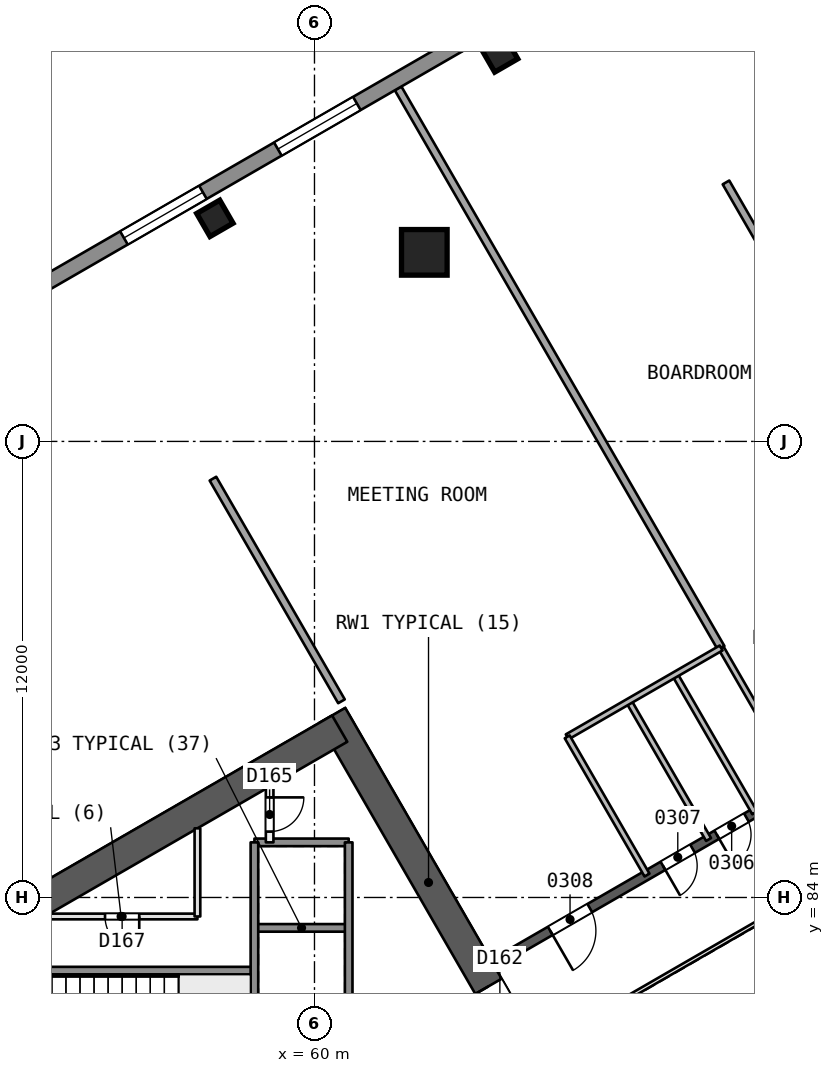
"""IFC4 building model, lengths in metres.
Left out: names, types, materials, properties, quantities, classifications, styles, units other than length and angle.
Written with IfcOpenShell. Run it as: python <this file> out.ifc"""

import sys

from ifc_helpers import new_model, si_unit, direction, frame, frame_2d, origin, origin_2d, place, context, subcontext, project, spatial, rectangle, extrude, element, fill, save


model = new_model("IFC4")
c1 = context("Model", 3, precision=1e-05, world=origin(), true_north=direction((0.0, 1.0)))
c2 = subcontext(c1, "Body", "Model", "MODEL_VIEW")
j1 = project(units=[si_unit("LENGTHUNIT", "METRE"), si_unit("PLANEANGLEUNIT", "RADIAN")], contexts=[c1])
p1 = place(None, origin())
s1 = spatial("IfcSite", under=j1, at=p1, CompositionType="ELEMENT")
p2 = place(p1, origin())
s2 = spatial("IfcBuilding", under=s1, at=p2, CompositionType="ELEMENT")
p3 = place(p2, frame((0.0, 0.0, 20.4)))
s3 = spatial("IfcBuildingStorey", under=s2, at=p3, CompositionType="ELEMENT", Elevation=20.4)
p4 = place(p3, frame((65.538, 80.0, 0.0), z_axis=(0.0, 0.0, 1.0), x_axis=(-0.49999662545, 0.866027352073, 0.0)))
e1 = element("IfcWall", 1, at=p4, inside=s3, PredefinedType="SHEAR", context=c2, shape_type="SweptSolid", body=[
    extrude(rectangle(XDim=10.149, YDim=0.8, at=frame_2d((5.074, 0.0))), origin(), (0.0, 0.0, 1.0), 5.0),
])
p5 = place(p4, frame((0.719, 0.0, 0.0)))
e2 = element("IfcOpeningElement", 2, at=p5, cuts=e1, PredefinedType="OPENING", context=c2, shape_type="SweptSolid", body=[
    extrude(rectangle(XDim=1.2, YDim=2.1, at=frame_2d((0.6, 1.05))), frame((0.0, 0.411, 0.0), z_axis=(0.0, -1.0, 0.0), x_axis=(1.0, 0.0, 0.0)), (0.0, 0.0, 1.0), 0.821),
])
p6 = place(p3, frame((60.664, 88.443, 0.0), z_axis=(0.0, 0.0, 1.0), x_axis=(-0.866029478545, -0.499992942241, 0.0)))
e3 = element("IfcWall", 3, at=p6, inside=s3, PredefinedType="SHEAR", context=c2, shape_type="SweptSolid", body=[
    extrude(rectangle(XDim=13.933, YDim=0.8, at=frame_2d((6.967, 0.0))), origin(), (0.0, 0.0, 1.0), 5.0),
])
p7 = place(p3, frame((78.2, 90.046, 0.0), z_axis=(0.0, 0.0, 1.0), x_axis=(-0.866026492143, -0.499998114903, 0.0)))
e4 = element("IfcWall", 4, at=p7, inside=s3, PredefinedType="SHEAR", context=c2, shape_type="SweptSolid", body=[
    extrude(rectangle(XDim=15.588, YDim=0.25, at=frame_2d((7.794, 0.0))), origin(), (0.0, 0.0, 1.0), 4.5),
])
p8 = place(p7, frame((2.518, 0.0, 0.0)))
e5 = element("IfcOpeningElement", 5, at=p8, cuts=e4, PredefinedType="OPENING", context=c2, shape_type="SweptSolid", body=[
    extrude(rectangle(XDim=1.2, YDim=2.4, at=frame_2d((0.6, 1.2))), frame((0.0, 0.135, 0.0), z_axis=(0.0, -1.0, 0.0), x_axis=(1.0, 0.0, 0.0)), (0.0, 0.0, 1.0), 0.271),
])
p9 = place(p7, frame((6.487, 0.0, 0.0)))
e6 = element("IfcOpeningElement", 6, at=p9, cuts=e4, PredefinedType="OPENING", context=c2, shape_type="SweptSolid", body=[
    extrude(rectangle(XDim=0.9, YDim=2.1, at=frame_2d((0.45, 1.05))), frame((0.0, 0.135, 0.0), z_axis=(0.0, -1.0, 0.0), x_axis=(1.0, 0.0, 0.0)), (0.0, 0.0, 1.0), 0.271),
])
p10 = place(p7, frame((7.89, 0.0, 0.0)))
e7 = element("IfcOpeningElement", 7, at=p10, cuts=e4, PredefinedType="OPENING", context=c2, shape_type="SweptSolid", body=[
    extrude(rectangle(XDim=0.9, YDim=2.1, at=frame_2d((0.45, 1.05))), frame((0.0, 0.135, 0.0), z_axis=(0.0, -1.0, 0.0), x_axis=(1.0, 0.0, 0.0)), (0.0, 0.0, 1.0), 0.271),
])
p11 = place(p7, frame((9.527, 0.0, 0.0)))
e8 = element("IfcOpeningElement", 8, at=p11, cuts=e4, PredefinedType="OPENING", context=c2, shape_type="SweptSolid", body=[
    extrude(rectangle(XDim=0.9, YDim=2.1, at=frame_2d((0.45, 1.05))), frame((0.0, 0.135, 0.0), z_axis=(0.0, -1.0, 0.0), x_axis=(1.0, 0.0, 0.0)), (0.0, 0.0, 1.0), 0.271),
])
p12 = place(p7, frame((12.65, 0.0, 0.0)))
e9 = element("IfcOpeningElement", 9, at=p12, cuts=e4, PredefinedType="OPENING", context=c2, shape_type="SweptSolid", body=[
    extrude(rectangle(XDim=1.2, YDim=2.4, at=frame_2d((0.6, 1.2))), frame((0.0, 0.135, 0.0), z_axis=(0.0, -1.0, 0.0), x_axis=(1.0, 0.0, 0.0)), (0.0, 0.0, 1.0), 0.271),
])
p13 = place(p3, frame((62.878, 100.996, 0.0), z_axis=(0.010056548747, -0.017476914813, 0.999796690971), x_axis=(0.866747029638, 0.498748019158, 9.2908e-08)))
e10 = element("IfcColumn", 10, at=p13, inside=s3, PredefinedType="COLUMN", context=c2, shape_type="SweptSolid", body=[
    extrude(rectangle(XDim=1.2, YDim=1.2, at=origin_2d()), origin(), (0.0, 0.0, 1.0), 5.001),
])
for number, where, z_axis, x_axis in (
    (11, (64.871, 106.195, 0.0), (0.0, 0.0, 1.0), (0.866, 0.5, 0.0)),
    (12, (57.379, 101.869, 0.0), (0.0, 0.0, 1.0), (0.866, 0.5, 0.0)),
):
    element("IfcColumn", number, at=place(p3, frame(where, z_axis=z_axis, x_axis=x_axis)), inside=s3, PredefinedType="COLUMN", context=c2, shape_type="SweptSolid", body=[
        extrude(rectangle(XDim=0.7, YDim=0.7, at=origin_2d()), origin(), (0.0, 0.0, 1.0), 5.0),
    ])
p14 = place(p3, frame((70.7, 90.565, 0.0), z_axis=(0.0, 0.0, 1.0), x_axis=(0.500027713859, -0.866009402589, 0.0)))
e13 = element("IfcWall", 13, at=p14, inside=s3, PredefinedType="PARTITIONING", context=c2, shape_type="SweptSolid", body=[
    extrude(rectangle(XDim=4.2, YDim=0.15, at=frame_2d((2.1, 0.0))), origin(), (0.0, 0.0, 1.0), 4.5),
])
p15 = place(p3, frame((62.2, 105.289, 0.0), z_axis=(0.0, 0.0, 1.0), x_axis=(0.49999717083, -0.8660270372, 0.0)))
e14 = element("IfcWall", 14, at=p15, inside=s3, PredefinedType="PARTITIONING", context=c2, shape_type="SweptSolid", body=[
    extrude(rectangle(XDim=17.001, YDim=0.2, at=frame_2d((8.5, 0.0))), origin(), (0.0, 0.0, 1.0), 4.5),
])
p16 = place(p3, frame((74.21, 96.956, 0.0), z_axis=(0.0, 0.0, 1.0), x_axis=(-0.499981745636, 0.86603594269, 0.0)))
e15 = element("IfcWall", 15, at=p16, inside=s3, PredefinedType="PARTITIONING", context=c2, shape_type="SweptSolid", body=[
    extrude(rectangle(XDim=6.765, YDim=0.2, at=frame_2d((3.382, 0.0))), origin(), (0.0, 0.0, 1.0), 4.5),
])
p17 = place(p16, frame((2.782, 0.0, 0.0)))
e16 = element("IfcOpeningElement", 16, at=p17, cuts=e15, PredefinedType="OPENING", context=c2, shape_type="SweptSolid", body=[
    extrude(rectangle(XDim=1.2, YDim=2.4, at=frame_2d((0.6, 1.2))), frame((0.0, 0.11, 0.0), z_axis=(0.0, -1.0, 0.0), x_axis=(1.0, 0.0, 0.0)), (0.0, 0.0, 1.0), 0.221),
])
p18 = place(p3, frame((69.485, 89.864, 0.0), z_axis=(0.0, 0.0, 1.0), x_axis=(0.49998411664, -0.866034573852, 0.0)))
e17 = element("IfcWall", 17, at=p18, inside=s3, PredefinedType="PARTITIONING", context=c2, shape_type="SweptSolid", body=[
    extrude(rectangle(XDim=4.2, YDim=0.15, at=frame_2d((2.1, 0.0))), origin(), (0.0, 0.0, 1.0), 4.5),
])
p19 = place(p3, frame((68.27, 89.163, 0.0), z_axis=(0.0, 0.0, 1.0), x_axis=(0.500002543286, -0.866023935413, 0.0)))
e18 = element("IfcWall", 18, at=p19, inside=s3, PredefinedType="PARTITIONING", context=c2, shape_type="SweptSolid", body=[
    extrude(rectangle(XDim=4.2, YDim=0.15, at=frame_2d((2.1, 0.0))), origin(), (0.0, 0.0, 1.0), 4.5),
])
p20 = place(p3, frame((70.7, 90.565, 0.0), z_axis=(0.0, 0.0, 1.0), x_axis=(-0.866017799667, -0.500013170487, 0.0)))
e19 = element("IfcWall", 19, at=p20, inside=s3, PredefinedType="PARTITIONING", context=c2, shape_type="SweptSolid", body=[
    extrude(rectangle(XDim=4.677, YDim=0.15, at=frame_2d((2.338, 0.0))), origin(), (0.0, 0.0, 1.0), 4.5),
])
p21 = place(p3, frame((66.65, 88.226, 0.0), z_axis=(0.0, 0.0, 1.0), x_axis=(0.500016035621, -0.866016145416, 0.0)))
e20 = element("IfcWall", 20, at=p21, inside=s3, PredefinedType="PARTITIONING", context=c2, shape_type="SweptSolid", body=[
    extrude(rectangle(XDim=4.199, YDim=0.15, at=frame_2d((2.1, 0.0))), origin(), (0.0, 0.0, 1.0), 4.5),
])
p22 = place(p3, frame((57.328, 95.02, 0.0), z_axis=(0.0, 0.0, 1.0), x_axis=(0.499981745636, -0.86603594269, 0.0)))
e21 = element("IfcWall", 21, at=p22, inside=s3, PredefinedType="PARTITIONING", context=c2, shape_type="SweptSolid", body=[
    extrude(rectangle(XDim=6.765, YDim=0.2, at=frame_2d((3.382, 0.0))), origin(), (0.0, 0.0, 1.0), 4.5),
])
p23 = place(p3, frame((26.66, 85.0, 0.0), z_axis=(0.0, 0.0, 1.0), x_axis=(0.866025599265, 0.499999661418, 0.0)))
e22 = element("IfcWall", 22, at=p23, inside=s3, PredefinedType="SOLIDWALL", context=c2, shape_type="SweptSolid", body=[
    extrude(rectangle(XDim=78.727, YDim=0.4, at=frame_2d((39.364, 0.0))), origin(), (0.0, 0.0, 1.0), 4.5),
])
p24 = place(p23, frame((42.84, 0.0, 0.9)))
e23 = element("IfcOpeningElement", 23, at=p24, cuts=e22, PredefinedType="OPENING", context=c2, shape_type="SweptSolid", body=[
    extrude(rectangle(XDim=2.4, YDim=2.4, at=frame_2d((1.2, 1.2))), frame((0.0, 0.21, 0.0), z_axis=(0.0, -1.0, 0.0), x_axis=(1.0, 0.0, 0.0)), (0.0, 0.0, 1.0), 0.421),
])
p25 = place(p23, frame((37.385, 0.0, 0.9)))
e24 = element("IfcOpeningElement", 24, at=p25, cuts=e22, PredefinedType="OPENING", context=c2, shape_type="SweptSolid", body=[
    extrude(rectangle(XDim=2.4, YDim=2.4, at=frame_2d((1.2, 1.2))), frame((0.0, 0.21, 0.0), z_axis=(0.0, -1.0, 0.0), x_axis=(1.0, 0.0, 0.0)), (0.0, 0.0, 1.0), 0.421),
])
p26 = place(p23, frame((32.708, 0.0, 0.9)))
e25 = element("IfcOpeningElement", 25, at=p26, cuts=e22, PredefinedType="OPENING", context=c2, shape_type="SweptSolid", body=[
    extrude(rectangle(XDim=2.4, YDim=2.4, at=frame_2d((1.2, 1.2))), frame((0.0, 0.21, 0.0), z_axis=(0.0, -1.0, 0.0), x_axis=(1.0, 0.0, 0.0)), (0.0, 0.0, 1.0), 0.421),
])
p27 = place(p3, frame((60.9, 85.45, 0.0), z_axis=(0.0, 0.0, 1.0), x_axis=(-1.0, 0.0, 0.0)))
e26 = element("IfcWall", 26, at=p27, inside=s3, PredefinedType="SOLIDWALL", context=c2, shape_type="SweptSolid", body=[
    extrude(rectangle(XDim=2.48, YDim=0.2, at=frame_2d((1.24, 0.0))), origin(), (0.0, 0.0, 1.0), 4.5),
])
p28 = place(p3, frame((56.92, 83.5, 0.0), z_axis=(0.0, 0.0, 1.0), x_axis=(-1.0, 0.0, 0.0)))
e27 = element("IfcWall", 27, at=p28, inside=s3, PredefinedType="PARTITIONING", context=c2, shape_type="SweptSolid", body=[
    extrude(rectangle(XDim=4.018, YDim=0.15, at=frame_2d((2.009, 0.0))), origin(), (0.0, 0.0, 1.0), 4.5),
])
p29 = place(p28, frame((1.531, 0.0, 0.0)))
e28 = element("IfcOpeningElement", 28, at=p29, cuts=e27, PredefinedType="OPENING", context=c2, shape_type="SweptSolid", body=[
    extrude(rectangle(XDim=0.9, YDim=2.1, at=frame_2d((0.45, 1.05))), frame((0.0, 0.085, 0.0), z_axis=(0.0, -1.0, 0.0), x_axis=(1.0, 0.0, 0.0)), (0.0, 0.0, 1.0), 0.171),
])
p30 = place(p3, frame((60.9, 83.2, 0.0), z_axis=(0.0, 0.0, 1.0), x_axis=(-1.0, 0.0, 0.0)))
e29 = element("IfcWall", 29, at=p30, inside=s3, PredefinedType="SOLIDWALL", context=c2, shape_type="SweptSolid", body=[
    extrude(rectangle(XDim=2.48, YDim=0.2, at=frame_2d((1.24, 0.0))), origin(), (0.0, 0.0, 1.0), 4.5),
])
p31 = place(p3, frame((58.42, 82.075, 0.0), z_axis=(0.0, 0.0, 1.0), x_axis=(-1.0, 0.0, 0.0)))
e30 = element("IfcWall", 30, at=p31, inside=s3, PredefinedType="SOLIDWALL", context=c2, shape_type="SweptSolid", body=[
    extrude(rectangle(XDim=7.7, YDim=0.2, at=frame_2d((3.85, 0.0))), origin(), (0.0, 0.0, 1.0), 4.5),
])
p32 = place(p3, frame((60.9, 85.45, 0.0), z_axis=(0.0, 0.0, 1.0), x_axis=(0.0, -1.0, 0.0)))
e31 = element("IfcWall", 31, at=p32, inside=s3, PredefinedType="SOLIDWALL", context=c2, shape_type="SweptSolid", body=[
    extrude(rectangle(XDim=10.9, YDim=0.2, at=frame_2d((5.45, 0.0))), origin(), (0.0, 0.0, 1.0), 4.5),
])
p33 = place(p3, frame((58.82, 86.917, 0.0), z_axis=(0.0, 0.0, 1.0), x_axis=(0.0, -1.0, 0.0)))
e32 = element("IfcWall", 32, at=p33, inside=s3, PredefinedType="PARTITIONING", context=c2, shape_type="SweptSolid", body=[
    extrude(rectangle(XDim=1.467, YDim=0.2, at=frame_2d((0.733, 0.0))), origin(), (0.0, 0.0, 1.0), 4.5),
])
p34 = place(p33, frame((0.283, 0.0, 0.0)))
e33 = element("IfcOpeningElement", 33, at=p34, cuts=e32, PredefinedType="OPENING", context=c2, shape_type="SweptSolid", body=[
    extrude(rectangle(XDim=0.9, YDim=2.1, at=frame_2d((0.45, 1.05))), frame((0.0, 0.11, 0.0), z_axis=(0.0, -1.0, 0.0), x_axis=(1.0, 0.0, 0.0)), (0.0, 0.0, 1.0), 0.221),
])
p35 = place(p3, frame((58.42, 85.45, 0.0), z_axis=(0.0, 0.0, 1.0), x_axis=(0.0, -1.0, 0.0)))
e34 = element("IfcWall", 34, at=p35, inside=s3, PredefinedType="SOLIDWALL", context=c2, shape_type="SweptSolid", body=[
    extrude(rectangle(XDim=9.0, YDim=0.2, at=frame_2d((4.5, 0.0))), origin(), (0.0, 0.0, 1.0), 4.5),
])
p36 = place(p3, frame((56.92, 85.82, 0.0), z_axis=(0.0, 0.0, 1.0), x_axis=(0.0, -1.0, 0.0)))
e35 = element("IfcWall", 35, at=p36, inside=s3, PredefinedType="PARTITIONING", context=c2, shape_type="SweptSolid", body=[
    extrude(rectangle(XDim=2.32, YDim=0.15, at=frame_2d((1.16, 0.0))), origin(), (0.0, 0.0, 1.0), 4.5),
])
p37 = place(p3, frame((77.738, 86.846, 0.0), z_axis=(0.0, 0.0, 1.0), x_axis=(-0.866026658274, -0.499997827154, 0.0)))
e36 = element("IfcWall", 36, at=p37, inside=s3, PredefinedType="PARTITIONING", context=c2, shape_type="SweptSolid", body=[
    extrude(rectangle(XDim=11.588, YDim=0.1, at=frame_2d((5.794, 0.0))), origin(), (0.0, 0.0, 1.0), 4.5),
])
p38 = place(p10, origin())
e37 = element("IfcDoor", 37, at=p38, inside=s3, OperationType="SINGLE_SWING_RIGHT", PredefinedType="NOTDEFINED", context=c2, shape_type="SweptSolid", body=[
    extrude(rectangle(XDim=0.9, YDim=2.1, at=frame_2d((0.45, 1.05))), frame((0.0, 0.025, 0.0), z_axis=(0.0, -1.0, 0.0), x_axis=(1.0, 0.0, 0.0)), (0.0, 0.0, 1.0), 0.05),
])
fill(e7, e37)
p39 = place(p11, origin())
e38 = element("IfcDoor", 38, at=p39, inside=s3, OperationType="SINGLE_SWING_RIGHT", PredefinedType="NOTDEFINED", context=c2, shape_type="SweptSolid", body=[
    extrude(rectangle(XDim=0.9, YDim=2.1, at=frame_2d((0.45, 1.05))), frame((0.0, 0.025, 0.0), z_axis=(0.0, -1.0, 0.0), x_axis=(1.0, 0.0, 0.0)), (0.0, 0.0, 1.0), 0.05),
])
fill(e8, e38)
p40 = place(p12, origin())
e39 = element("IfcDoor", 39, at=p40, inside=s3, OperationType="SINGLE_SWING_RIGHT", PredefinedType="NOTDEFINED", context=c2, shape_type="SweptSolid", body=[
    extrude(rectangle(XDim=1.2, YDim=2.4, at=frame_2d((0.6, 1.2))), frame((0.0, 0.025, 0.0), z_axis=(0.0, -1.0, 0.0), x_axis=(1.0, 0.0, 0.0)), (0.0, 0.0, 1.0), 0.05),
])
fill(e9, e39)
p41 = place(p25, origin())
e40 = element("IfcWindow", 40, at=p41, inside=s3, PartitioningType="SINGLE_PANEL", PredefinedType="WINDOW", context=c2, shape_type="SweptSolid", body=[
    extrude(rectangle(XDim=2.4, YDim=2.4, at=frame_2d((1.2, 1.2))), frame((0.0, 0.03, 0.0), z_axis=(0.0, -1.0, 0.0), x_axis=(1.0, 0.0, 0.0)), (0.0, 0.0, 1.0), 0.06),
])
fill(e24, e40)
p42 = place(p26, origin())
e41 = element("IfcWindow", 41, at=p42, inside=s3, PartitioningType="SINGLE_PANEL", PredefinedType="WINDOW", context=c2, shape_type="SweptSolid", body=[
    extrude(rectangle(XDim=2.4, YDim=2.4, at=frame_2d((1.2, 1.2))), frame((0.0, 0.03, 0.0), z_axis=(0.0, -1.0, 0.0), x_axis=(1.0, 0.0, 0.0)), (0.0, 0.0, 1.0), 0.06),
])
fill(e25, e41)
p43 = place(p5, origin())
e42 = element("IfcDoor", 42, at=p43, inside=s3, OperationType="SINGLE_SWING_RIGHT", PredefinedType="NOTDEFINED", context=c2, shape_type="SweptSolid", body=[
    extrude(rectangle(XDim=1.2, YDim=2.1, at=frame_2d((0.6, 1.05))), frame((0.0, 0.025, 0.0), z_axis=(0.0, -1.0, 0.0), x_axis=(1.0, 0.0, 0.0)), (0.0, 0.0, 1.0), 0.05),
])
fill(e2, e42)
p44 = place(p34, origin())
e43 = element("IfcDoor", 43, at=p44, inside=s3, OperationType="SINGLE_SWING_LEFT", PredefinedType="NOTDEFINED", context=c2, shape_type="SweptSolid", body=[
    extrude(rectangle(XDim=0.9, YDim=2.1, at=frame_2d((0.45, 1.05))), frame((0.0, 0.025, 0.0), z_axis=(0.0, -1.0, 0.0), x_axis=(1.0, 0.0, 0.0)), (0.0, 0.0, 1.0), 0.05),
])
fill(e33, e43)
p45 = place(p29, origin())
e44 = element("IfcDoor", 44, at=p45, inside=s3, OperationType="SINGLE_SWING_LEFT", PredefinedType="NOTDEFINED", context=c2, shape_type="SweptSolid", body=[
    extrude(rectangle(XDim=0.9, YDim=2.1, at=frame_2d((0.45, 1.05))), frame((0.0, 0.025, 0.0), z_axis=(0.0, -1.0, 0.0), x_axis=(1.0, 0.0, 0.0)), (0.0, 0.0, 1.0), 0.05),
])
fill(e28, e44)
save(model, sys.argv[1])
